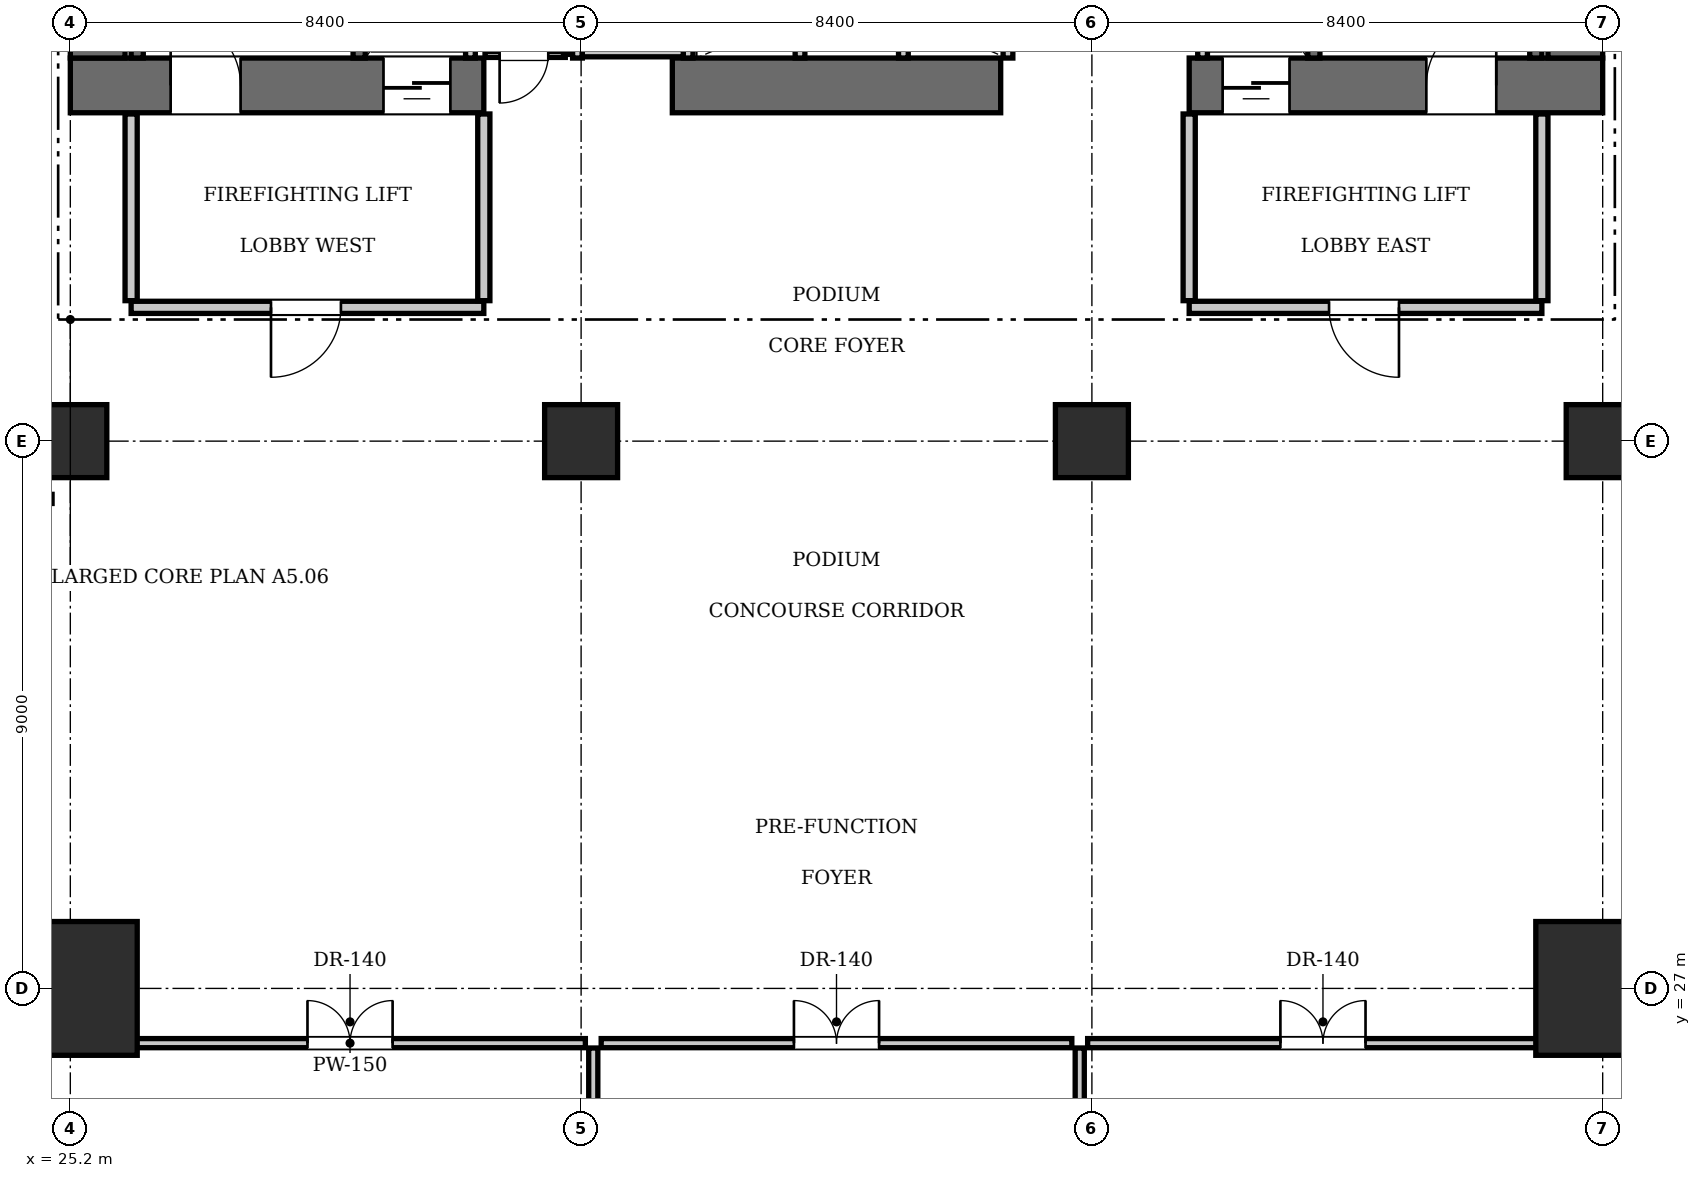
"""IFC4 building model, lengths in metres.
Left out: names, types, materials, properties, quantities, classifications, styles, units other than length and angle.
Written with IfcOpenShell. Run it as: python <this file> out.ifc"""

import sys

from ifc_helpers import new_model, si_unit, direction, frame, frame_2d, origin, origin_2d, place, context, subcontext, project, spatial, rectangle, extrude, element, fill, save


model = new_model("IFC4")
c1 = context("Model", 3, precision=1e-05, world=origin(), true_north=direction((0.0, 1.0)))
c2 = subcontext(c1, "Body", "Model", "MODEL_VIEW")
j1 = project(units=[si_unit("LENGTHUNIT", "METRE"), si_unit("PLANEANGLEUNIT", "RADIAN")], contexts=[c1])
p1 = place(None, origin())
s1 = spatial("IfcSite", under=j1, at=p1, CompositionType="ELEMENT")
p2 = place(p1, origin())
s2 = spatial("IfcBuilding", under=s1, at=p2, CompositionType="ELEMENT")
p3 = place(p2, frame((0.0, 0.0, 16.45)))
s3 = spatial("IfcBuildingStorey", under=s2, at=p3, CompositionType="ELEMENT", Elevation=16.45)
for number, where, z_axis, x_axis in (
    (1, (25.2, 27.0, 0.0), (0.0, 0.0, 1.0), (1.0, 0.0, 0.0)),
    (2, (50.4, 27.0, 0.0), (0.0, 0.0, 1.0), (1.0, 0.0, 0.0)),
):
    element("IfcColumn", number, at=place(p3, frame(where, z_axis=z_axis, x_axis=x_axis)), inside=s3, PredefinedType="COLUMN", context=c2, shape_type="SweptSolid", body=[
        extrude(rectangle(XDim=2.2, YDim=2.2, at=origin_2d()), origin(), (0.0, 0.0, 1.0), 4.9),
    ])
p4 = place(p3, frame((25.2, 41.85, 0.0), z_axis=(0.0, 0.0, 1.0), x_axis=(1.0, 0.0, 0.0)))
e3 = element("IfcWall", 3, at=p4, inside=s3, PredefinedType="SHEAR", context=c2, shape_type="SweptSolid", body=[
    extrude(rectangle(XDim=6.8, YDim=0.9, at=frame_2d((3.4, 0.0))), origin(), (0.0, 0.0, 1.0), 4.9),
])
p5 = place(p4, frame((1.65, 0.0, 0.0)))
e4 = element("IfcOpeningElement", 4, at=p5, cuts=e3, PredefinedType="OPENING", context=c2, shape_type="SweptSolid", body=[
    extrude(rectangle(XDim=1.15, YDim=2.15, at=frame_2d((0.575, 1.075))), frame((0.0, 0.46, 0.0), z_axis=(0.0, -1.0, 0.0), x_axis=(1.0, 0.0, 0.0)), (0.0, 0.0, 1.0), 0.92),
])
p6 = place(p4, frame((5.15, 0.0, 0.0)))
e5 = element("IfcOpeningElement", 5, at=p6, cuts=e3, PredefinedType="OPENING", context=c2, shape_type="SweptSolid", body=[
    extrude(rectangle(XDim=1.1, YDim=2.2, at=frame_2d((0.55, 1.1))), frame((0.0, 0.46, 0.0), z_axis=(0.0, -1.0, 0.0), x_axis=(1.0, 0.0, 0.0)), (0.0, 0.0, 1.0), 0.92),
])
p7 = place(p3, frame((35.1, 41.85, 0.0), z_axis=(0.0, 0.0, 1.0), x_axis=(1.0, 0.0, 0.0)))
e6 = element("IfcWall", 6, at=p7, inside=s3, PredefinedType="SHEAR", context=c2, shape_type="SweptSolid", body=[
    extrude(rectangle(XDim=5.4, YDim=0.9, at=frame_2d((2.7, 0.0))), origin(), (0.0, 0.0, 1.0), 4.9),
])
p8 = place(p3, frame((43.6, 41.85, 0.0), z_axis=(0.0, 0.0, 1.0), x_axis=(1.0, 0.0, 0.0)))
e7 = element("IfcWall", 7, at=p8, inside=s3, PredefinedType="SHEAR", context=c2, shape_type="SweptSolid", body=[
    extrude(rectangle(XDim=6.8, YDim=0.9, at=frame_2d((3.4, 0.0))), origin(), (0.0, 0.0, 1.0), 4.9),
])
p9 = place(p8, frame((3.9, 0.0, 0.0)))
e8 = element("IfcOpeningElement", 8, at=p9, cuts=e7, PredefinedType="OPENING", context=c2, shape_type="SweptSolid", body=[
    extrude(rectangle(XDim=1.15, YDim=2.15, at=frame_2d((0.575, 1.075))), frame((0.0, 0.46, 0.0), z_axis=(0.0, -1.0, 0.0), x_axis=(1.0, 0.0, 0.0)), (0.0, 0.0, 1.0), 0.92),
])
p10 = place(p8, frame((0.55, 0.0, 0.0)))
e9 = element("IfcOpeningElement", 9, at=p10, cuts=e7, PredefinedType="OPENING", context=c2, shape_type="SweptSolid", body=[
    extrude(rectangle(XDim=1.1, YDim=2.2, at=frame_2d((0.55, 1.1))), frame((0.0, 0.46, 0.0), z_axis=(0.0, -1.0, 0.0), x_axis=(1.0, 0.0, 0.0)), (0.0, 0.0, 1.0), 0.92),
])
for number, where, z_axis, x_axis in (
    (10, (25.65, 42.3, 0.0), (0.0, 0.0, 1.0), (0.0, 1.0, 0.0)),
    (11, (49.95, 42.3, 0.0), (0.0, 0.0, 1.0), (0.0, 1.0, 0.0)),
):
    element("IfcWall", number, at=place(p3, frame(where, z_axis=z_axis, x_axis=x_axis)), inside=s3, PredefinedType="SHEAR", context=c2, shape_type="SweptSolid", body=[
        extrude(rectangle(XDim=1.6, YDim=0.9, at=frame_2d((0.8, 0.0))), origin(), (0.0, 0.0, 1.0), 4.9),
    ])
for number, where, z_axis, x_axis in (
    (12, (25.2, 36.0, 0.0), (0.0, 0.0, 1.0), (1.0, 0.0, 0.0)),
    (13, (33.6, 36.0, 0.0), (0.0, 0.0, 1.0), (1.0, 0.0, 0.0)),
    (14, (42.0, 36.0, 0.0), (0.0, 0.0, 1.0), (1.0, 0.0, 0.0)),
    (15, (50.4, 36.0, 0.0), (0.0, 0.0, 1.0), (1.0, 0.0, 0.0)),
):
    element("IfcColumn", number, at=place(p3, frame(where, z_axis=z_axis, x_axis=x_axis)), inside=s3, PredefinedType="COLUMN", context=c2, shape_type="SweptSolid", body=[
        extrude(rectangle(XDim=1.2, YDim=1.2, at=origin_2d()), origin(), (0.0, 0.0, 1.0), 4.9),
    ])
p11 = place(p3, frame((29.95, 42.3, 0.0), z_axis=(0.0, 0.0, 1.0), x_axis=(0.0, 1.0, 0.0)))
e16 = element("IfcWall", 16, at=p11, inside=s3, PredefinedType="SOLIDWALL", context=c2, shape_type="SweptSolid", body=[
    extrude(rectangle(XDim=8.85, YDim=0.2, at=frame_2d((4.425, 0.0))), origin(), (0.0, 0.0, 1.0), 4.62),
])
p12 = place(p3, frame((26.3, 42.3, 0.0), z_axis=(0.0, 0.0, 1.0), x_axis=(0.0, 1.0, 0.0)))
e17 = element("IfcWall", 17, at=p12, inside=s3, PredefinedType="SOLIDWALL", context=c2, shape_type="SweptSolid", body=[
    extrude(rectangle(XDim=1.58, YDim=0.2, at=frame_2d((0.79, 0.0))), origin(), (0.0, 0.0, 1.0), 4.62),
])
p13 = place(p3, frame((45.65, 42.3, 0.0), z_axis=(0.0, 0.0, 1.0), x_axis=(0.0, 1.0, 0.0)))
e18 = element("IfcWall", 18, at=p13, inside=s3, PredefinedType="SOLIDWALL", context=c2, shape_type="SweptSolid", body=[
    extrude(rectangle(XDim=8.85, YDim=0.2, at=frame_2d((4.425, 0.0))), origin(), (0.0, 0.0, 1.0), 4.62),
])
p14 = place(p3, frame((49.3, 42.3, 0.0), z_axis=(0.0, 0.0, 1.0), x_axis=(0.0, 1.0, 0.0)))
e19 = element("IfcWall", 19, at=p14, inside=s3, PredefinedType="SOLIDWALL", context=c2, shape_type="SweptSolid", body=[
    extrude(rectangle(XDim=1.58, YDim=0.2, at=frame_2d((0.79, 0.0))), origin(), (0.0, 0.0, 1.0), 4.62),
])
for number, where, z_axis, x_axis in (
    (20, (31.78, 42.3, 0.0), (0.0, 0.0, 1.0), (0.0, 1.0, 0.0)),
    (21, (43.82, 42.3, 0.0), (0.0, 0.0, 1.0), (0.0, 1.0, 0.0)),
):
    element("IfcWall", number, at=place(p3, frame(where, z_axis=z_axis, x_axis=x_axis)), inside=s3, PredefinedType="SOLIDWALL", context=c2, shape_type="SweptSolid", body=[
        extrude(rectangle(XDim=2.44, YDim=0.16, at=frame_2d((1.22, 0.0))), origin(), (0.0, 0.0, 1.0), 4.62),
    ])
for number, where, z_axis, x_axis in (
    (22, (37.2, 42.3, 0.0), (0.0, 0.0, 1.0), (0.0, 1.0, 0.0)),
    (23, (38.9, 42.3, 0.0), (0.0, 0.0, 1.0), (0.0, 1.0, 0.0)),
    (24, (40.62, 42.3, 0.0), (0.0, 0.0, 1.0), (0.0, 1.0, 0.0)),
):
    element("IfcWall", number, at=place(p3, frame(where, z_axis=z_axis, x_axis=x_axis)), inside=s3, PredefinedType="SOLIDWALL", context=c2, shape_type="SweptSolid", body=[
        extrude(rectangle(XDim=2.05, YDim=0.16, at=frame_2d((1.025, 0.0))), origin(), (0.0, 0.0, 1.0), 4.62),
    ])
for number, where, z_axis, x_axis in (
    (25, (33.54, 42.3, 0.0), (0.0, 0.0, 1.0), (0.0, 1.0, 0.0)),
    (26, (35.36, 42.3, 0.0), (0.0, 0.0, 1.0), (0.0, 1.0, 0.0)),
):
    element("IfcWall", number, at=place(p3, frame(where, z_axis=z_axis, x_axis=x_axis)), inside=s3, PredefinedType="SOLIDWALL", context=c2, shape_type="SweptSolid", body=[
        extrude(rectangle(XDim=2.1, YDim=0.16, at=frame_2d((1.05, 0.0))), origin(), (0.0, 0.0, 1.0), 4.62),
    ])
p15 = place(p3, frame((33.62, 42.4, 0.0), z_axis=(0.0, 0.0, 1.0), x_axis=(1.0, 0.0, 0.0)))
e27 = element("IfcWall", 27, at=p15, inside=s3, PredefinedType="SOLIDWALL", context=c2, shape_type="SweptSolid", body=[
    extrude(rectangle(XDim=1.66, YDim=0.16, at=frame_2d((0.83, 0.0))), origin(), (0.0, 0.0, 1.0), 4.62),
])
p16 = place(p3, frame((26.2, 38.2, 0.0), z_axis=(0.0, 0.0, 1.0), x_axis=(1.0, 0.0, 0.0)))
e28 = element("IfcWall", 28, at=p16, inside=s3, PredefinedType="PARTITIONING", context=c2, shape_type="SweptSolid", body=[
    extrude(rectangle(XDim=5.8, YDim=0.2, at=frame_2d((2.9, 0.0))), origin(), (0.0, 0.0, 1.0), 4.62),
])
p17 = place(p16, frame((2.3, 0.0, 0.0)))
e29 = element("IfcOpeningElement", 29, at=p17, cuts=e28, PredefinedType="OPENING", context=c2, shape_type="SweptSolid", body=[
    extrude(rectangle(XDim=1.15, YDim=2.15, at=frame_2d((0.575, 1.075))), frame((0.0, 0.11, 0.0), z_axis=(0.0, -1.0, 0.0), x_axis=(1.0, 0.0, 0.0)), (0.0, 0.0, 1.0), 0.22),
])
for number, where, z_axis, x_axis in (
    (30, (26.2, 38.31, 0.0), (0.0, 0.0, 1.0), (0.0, 1.0, 0.0)),
    (31, (32.0, 38.31, 0.0), (0.0, 0.0, 1.0), (0.0, 1.0, 0.0)),
):
    element("IfcWall", number, at=place(p3, frame(where, z_axis=z_axis, x_axis=x_axis)), inside=s3, PredefinedType="PARTITIONING", context=c2, shape_type="SweptSolid", body=[
        extrude(rectangle(XDim=3.07, YDim=0.2, at=frame_2d((1.535, 0.0))), origin(), (0.0, 0.0, 1.0), 4.62),
    ])
p18 = place(p3, frame((43.6, 38.2, 0.0), z_axis=(0.0, 0.0, 1.0), x_axis=(1.0, 0.0, 0.0)))
e32 = element("IfcWall", 32, at=p18, inside=s3, PredefinedType="PARTITIONING", context=c2, shape_type="SweptSolid", body=[
    extrude(rectangle(XDim=5.8, YDim=0.2, at=frame_2d((2.9, 0.0))), origin(), (0.0, 0.0, 1.0), 4.62),
])
p19 = place(p18, frame((2.3, 0.0, 0.0)))
e33 = element("IfcOpeningElement", 33, at=p19, cuts=e32, PredefinedType="OPENING", context=c2, shape_type="SweptSolid", body=[
    extrude(rectangle(XDim=1.15, YDim=2.15, at=frame_2d((0.575, 1.075))), frame((0.0, 0.11, 0.0), z_axis=(0.0, -1.0, 0.0), x_axis=(1.0, 0.0, 0.0)), (0.0, 0.0, 1.0), 0.22),
])
for number, where, z_axis, x_axis in (
    (34, (43.6, 38.31, 0.0), (0.0, 0.0, 1.0), (0.0, 1.0, 0.0)),
    (35, (49.4, 38.31, 0.0), (0.0, 0.0, 1.0), (0.0, 1.0, 0.0)),
):
    element("IfcWall", number, at=place(p3, frame(where, z_axis=z_axis, x_axis=x_axis)), inside=s3, PredefinedType="PARTITIONING", context=c2, shape_type="SweptSolid", body=[
        extrude(rectangle(XDim=3.07, YDim=0.2, at=frame_2d((1.535, 0.0))), origin(), (0.0, 0.0, 1.0), 4.62),
    ])
p20 = place(p3, frame((32.02, 42.36, 0.0), z_axis=(0.0, 0.0, 1.0), x_axis=(1.0, 0.0, 0.0)))
e36 = element("IfcWall", 36, at=p20, inside=s3, PredefinedType="PARTITIONING", context=c2, shape_type="SweptSolid", body=[
    extrude(rectangle(XDim=1.32, YDim=0.1, at=frame_2d((0.66, 0.0))), origin(), (0.0, 0.0, 1.0), 4.62),
])
p21 = place(p20, frame((0.24, 0.0, 0.0)))
e37 = element("IfcOpeningElement", 37, at=p21, cuts=e36, PredefinedType="OPENING", context=c2, shape_type="SweptSolid", body=[
    extrude(rectangle(XDim=0.8, YDim=2.05, at=frame_2d((0.4, 1.025))), frame((0.0, 0.06, 0.0), z_axis=(0.0, -1.0, 0.0), x_axis=(1.0, 0.0, 0.0)), (0.0, 0.0, 1.0), 0.12),
])
p22 = place(p3, frame((33.36, 42.36, 0.0), z_axis=(0.0, 0.0, 1.0), x_axis=(0.0, 1.0, 0.0)))
e38 = element("IfcWall", 38, at=p22, inside=s3, PredefinedType="PARTITIONING", context=c2, shape_type="SweptSolid", body=[
    extrude(rectangle(XDim=2.58, YDim=0.1, at=frame_2d((1.29, 0.0))), origin(), (0.0, 0.0, 1.0), 4.62),
])
p23 = place(p3, frame((25.93, 26.1, 0.0), z_axis=(0.0, 0.0, 1.0), x_axis=(1.0, 0.0, 0.0)))
e39 = element("IfcWall", 39, at=p23, inside=s3, PredefinedType="PARTITIONING", context=c2, shape_type="SweptSolid", body=[
    extrude(rectangle(XDim=7.74, YDim=0.15, at=frame_2d((3.87, 0.0))), origin(), (0.0, 0.0, 1.0), 4.62),
])
p24 = place(p23, frame((3.17, 0.0, 0.0)))
e40 = element("IfcOpeningElement", 40, at=p24, cuts=e39, PredefinedType="OPENING", context=c2, shape_type="SweptSolid", body=[
    extrude(rectangle(XDim=1.4, YDim=2.2, at=frame_2d((0.7, 1.1))), frame((0.0, 0.085, 0.0), z_axis=(0.0, -1.0, 0.0), x_axis=(1.0, 0.0, 0.0)), (0.0, 0.0, 1.0), 0.17),
])
p25 = place(p3, frame((33.93, 26.1, 0.0), z_axis=(0.0, 0.0, 1.0), x_axis=(1.0, 0.0, 0.0)))
e41 = element("IfcWall", 41, at=p25, inside=s3, PredefinedType="PARTITIONING", context=c2, shape_type="SweptSolid", body=[
    extrude(rectangle(XDim=7.74, YDim=0.15, at=frame_2d((3.87, 0.0))), origin(), (0.0, 0.0, 1.0), 4.62),
])
p26 = place(p25, frame((3.17, 0.0, 0.0)))
e42 = element("IfcOpeningElement", 42, at=p26, cuts=e41, PredefinedType="OPENING", context=c2, shape_type="SweptSolid", body=[
    extrude(rectangle(XDim=1.4, YDim=2.2, at=frame_2d((0.7, 1.1))), frame((0.0, 0.085, 0.0), z_axis=(0.0, -1.0, 0.0), x_axis=(1.0, 0.0, 0.0)), (0.0, 0.0, 1.0), 0.17),
])
p27 = place(p3, frame((41.93, 26.1, 0.0), z_axis=(0.0, 0.0, 1.0), x_axis=(1.0, 0.0, 0.0)))
e43 = element("IfcWall", 43, at=p27, inside=s3, PredefinedType="PARTITIONING", context=c2, shape_type="SweptSolid", body=[
    extrude(rectangle(XDim=7.74, YDim=0.15, at=frame_2d((3.87, 0.0))), origin(), (0.0, 0.0, 1.0), 4.62),
])
p28 = place(p27, frame((3.17, 0.0, 0.0)))
e44 = element("IfcOpeningElement", 44, at=p28, cuts=e43, PredefinedType="OPENING", context=c2, shape_type="SweptSolid", body=[
    extrude(rectangle(XDim=1.4, YDim=2.2, at=frame_2d((0.7, 1.1))), frame((0.0, 0.085, 0.0), z_axis=(0.0, -1.0, 0.0), x_axis=(1.0, 0.0, 0.0)), (0.0, 0.0, 1.0), 0.17),
])
for number, where, z_axis, x_axis in (
    (45, (33.8, 0.22, 0.0), (0.0, 0.0, 1.0), (0.0, 1.0, 0.0)),
    (46, (41.8, 0.22, 0.0), (0.0, 0.0, 1.0), (0.0, 1.0, 0.0)),
):
    element("IfcWall", number, at=place(p3, frame(where, z_axis=z_axis, x_axis=x_axis)), inside=s3, PredefinedType="PARTITIONING", context=c2, shape_type="SweptSolid", body=[
        extrude(rectangle(XDim=25.8, YDim=0.15, at=frame_2d((12.9, 0.0))), origin(), (0.0, 0.0, 1.0), 4.62),
    ])
p29 = place(p5, origin())
e47 = element("IfcDoor", 47, at=p29, inside=s3, OperationType="SINGLE_SWING_LEFT", PredefinedType="DOOR", context=c2, shape_type="SweptSolid", body=[
    extrude(rectangle(XDim=1.15, YDim=2.15, at=frame_2d((0.575, 1.075))), frame((0.0, 0.025, 0.0), z_axis=(0.0, -1.0, 0.0), x_axis=(1.0, 0.0, 0.0)), (0.0, 0.0, 1.0), 0.05),
])
fill(e4, e47)
p30 = place(p9, origin())
e48 = element("IfcDoor", 48, at=p30, inside=s3, OperationType="SINGLE_SWING_RIGHT", PredefinedType="DOOR", context=c2, shape_type="SweptSolid", body=[
    extrude(rectangle(XDim=1.15, YDim=2.15, at=frame_2d((0.575, 1.075))), frame((0.0, 0.025, 0.0), z_axis=(0.0, -1.0, 0.0), x_axis=(1.0, 0.0, 0.0)), (0.0, 0.0, 1.0), 0.05),
])
fill(e8, e48)
p31 = place(p6, frame((1.1, 0.0, 0.0), z_axis=(0.0, 0.0, 1.0), x_axis=(-1.0, 0.0, 0.0)))
e49 = element("IfcDoor", 49, at=p31, inside=s3, OperationType="SLIDING_TO_LEFT", PredefinedType="DOOR", context=c2, shape_type="SweptSolid", body=[
    extrude(rectangle(XDim=1.1, YDim=2.2, at=frame_2d((0.55, 1.1))), frame((0.0, 0.025, 0.0), z_axis=(0.0, -1.0, 0.0), x_axis=(1.0, 0.0, 0.0)), (0.0, 0.0, 1.0), 0.05),
])
fill(e5, e49)
p32 = place(p10, frame((1.1, 0.0, 0.0), z_axis=(0.0, 0.0, 1.0), x_axis=(-1.0, 0.0, 0.0)))
e50 = element("IfcDoor", 50, at=p32, inside=s3, OperationType="SLIDING_TO_LEFT", PredefinedType="DOOR", context=c2, shape_type="SweptSolid", body=[
    extrude(rectangle(XDim=1.1, YDim=2.2, at=frame_2d((0.55, 1.1))), frame((0.0, 0.025, 0.0), z_axis=(0.0, -1.0, 0.0), x_axis=(1.0, 0.0, 0.0)), (0.0, 0.0, 1.0), 0.05),
])
fill(e9, e50)
p33 = place(p17, frame((1.15, 0.0, 0.0), z_axis=(0.0, 0.0, 1.0), x_axis=(-1.0, 0.0, 0.0)))
e51 = element("IfcDoor", 51, at=p33, inside=s3, OperationType="SINGLE_SWING_RIGHT", PredefinedType="DOOR", context=c2, shape_type="SweptSolid", body=[
    extrude(rectangle(XDim=1.15, YDim=2.15, at=frame_2d((0.575, 1.075))), frame((0.0, 0.025, 0.0), z_axis=(0.0, -1.0, 0.0), x_axis=(1.0, 0.0, 0.0)), (0.0, 0.0, 1.0), 0.05),
])
fill(e29, e51)
p34 = place(p19, frame((1.15, 0.0, 0.0), z_axis=(0.0, 0.0, 1.0), x_axis=(-1.0, 0.0, 0.0)))
e52 = element("IfcDoor", 52, at=p34, inside=s3, OperationType="SINGLE_SWING_LEFT", PredefinedType="DOOR", context=c2, shape_type="SweptSolid", body=[
    extrude(rectangle(XDim=1.15, YDim=2.15, at=frame_2d((0.575, 1.075))), frame((0.0, 0.025, 0.0), z_axis=(0.0, -1.0, 0.0), x_axis=(1.0, 0.0, 0.0)), (0.0, 0.0, 1.0), 0.05),
])
fill(e33, e52)
p35 = place(p21, frame((0.8, 0.0, 0.0), z_axis=(0.0, 0.0, 1.0), x_axis=(-1.0, 0.0, 0.0)))
e53 = element("IfcDoor", 53, at=p35, inside=s3, OperationType="SINGLE_SWING_RIGHT", PredefinedType="DOOR", context=c2, shape_type="SweptSolid", body=[
    extrude(rectangle(XDim=0.8, YDim=2.05, at=frame_2d((0.4, 1.025))), frame((0.0, 0.025, 0.0), z_axis=(0.0, -1.0, 0.0), x_axis=(1.0, 0.0, 0.0)), (0.0, 0.0, 1.0), 0.05),
])
fill(e37, e53)
p36 = place(p24, origin())
e54 = element("IfcDoor", 54, at=p36, inside=s3, OperationType="DOUBLE_DOOR_SINGLE_SWING", PredefinedType="DOOR", context=c2, shape_type="SweptSolid", body=[
    extrude(rectangle(XDim=1.4, YDim=2.2, at=frame_2d((0.7, 1.1))), frame((0.0, 0.025, 0.0), z_axis=(0.0, -1.0, 0.0), x_axis=(1.0, 0.0, 0.0)), (0.0, 0.0, 1.0), 0.05),
])
fill(e40, e54)
p37 = place(p26, origin())
e55 = element("IfcDoor", 55, at=p37, inside=s3, OperationType="DOUBLE_DOOR_SINGLE_SWING", PredefinedType="DOOR", context=c2, shape_type="SweptSolid", body=[
    extrude(rectangle(XDim=1.4, YDim=2.2, at=frame_2d((0.7, 1.1))), frame((0.0, 0.025, 0.0), z_axis=(0.0, -1.0, 0.0), x_axis=(1.0, 0.0, 0.0)), (0.0, 0.0, 1.0), 0.05),
])
fill(e42, e55)
p38 = place(p28, origin())
e56 = element("IfcDoor", 56, at=p38, inside=s3, OperationType="DOUBLE_DOOR_SINGLE_SWING", PredefinedType="DOOR", context=c2, shape_type="SweptSolid", body=[
    extrude(rectangle(XDim=1.4, YDim=2.2, at=frame_2d((0.7, 1.1))), frame((0.0, 0.025, 0.0), z_axis=(0.0, -1.0, 0.0), x_axis=(1.0, 0.0, 0.0)), (0.0, 0.0, 1.0), 0.05),
])
fill(e44, e56)
save(model, sys.argv[1])
